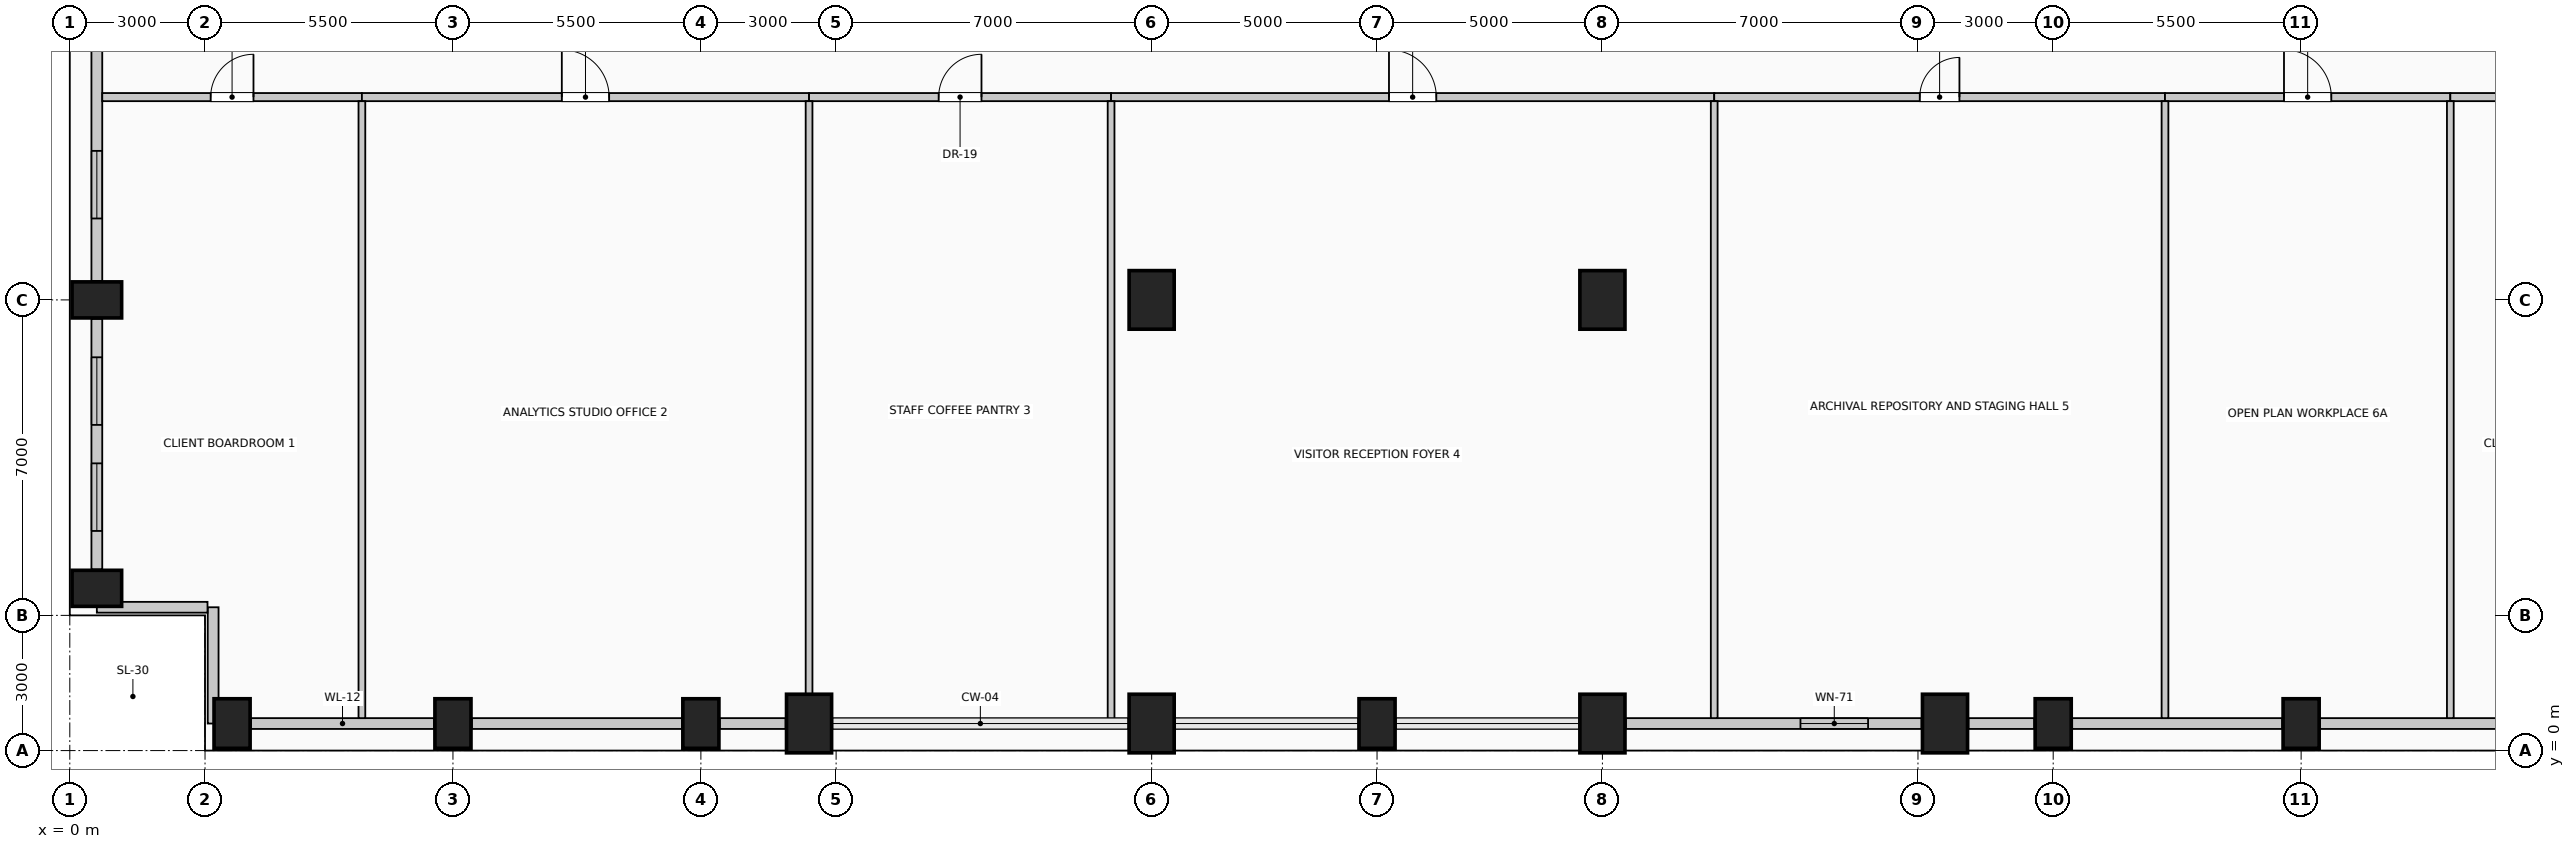
"""IFC4 building model, lengths in metres.
Left out: names, types, materials, properties, quantities, classifications, styles, units other than length and angle.
Written with IfcOpenShell. Run it as: python <this file> out.ifc"""

import sys

from ifc_helpers import new_model, si_unit, direction, frame, frame_2d, origin, origin_2d, place, context, subcontext, project, spatial, rectangle, extrude, element, fill, save


model = new_model("IFC4")
c1 = context("Model", 3, precision=1e-05, world=origin(), true_north=direction((0.0, 1.0)))
c2 = subcontext(c1, "Body", "Model", "MODEL_VIEW")
j1 = project(units=[si_unit("LENGTHUNIT", "METRE"), si_unit("PLANEANGLEUNIT", "RADIAN")], contexts=[c1])
p1 = place(None, origin())
s1 = spatial("IfcSite", under=j1, at=p1, CompositionType="ELEMENT")
p2 = place(p1, origin())
s2 = spatial("IfcBuilding", under=s1, at=p2, CompositionType="ELEMENT")
p3 = place(p2, frame((0.0, 0.0, 202.6)))
s3 = spatial("IfcBuildingStorey", under=s2, at=p3, CompositionType="ELEMENT", Elevation=202.6)
for number, where, z_axis, x_axis in (
    (1, (3.6, 0.6, 0.0), (0.0, 0.0, 1.0), (1.0, 0.0, 0.0)),
    (2, (8.5, 0.6, 0.0), (0.0, 0.0, 1.0), (1.0, 0.0, 0.0)),
    (3, (14.0, 0.6, 0.0), (0.0, 0.0, 1.0), (1.0, 0.0, 0.0)),
):
    element("IfcColumn", number, at=place(p3, frame(where, z_axis=z_axis, x_axis=x_axis)), inside=s3, PredefinedType="COLUMN", context=c2, shape_type="SweptSolid", body=[
        extrude(rectangle(XDim=0.8, YDim=1.1, at=origin_2d()), origin(), (0.0, 0.0, 1.0), 4.0),
    ])
for number, where, z_axis, x_axis in (
    (4, (16.4, 0.6, 0.0), (0.0, 0.0, 1.0), (1.0, 0.0, 0.0)),
    (5, (24.0, 0.6, 0.0), (0.0, 0.0, 1.0), (1.0, 0.0, 0.0)),
):
    element("IfcColumn", number, at=place(p3, frame(where, z_axis=z_axis, x_axis=x_axis)), inside=s3, PredefinedType="COLUMN", context=c2, shape_type="SweptSolid", body=[
        extrude(rectangle(XDim=1.0, YDim=1.3, at=origin_2d()), origin(), (0.0, 0.0, 1.0), 4.0),
    ])
p4 = place(p3, frame((29.0, 0.6, 0.0), z_axis=(0.0, 0.0, 1.0), x_axis=(1.0, 0.0, 0.0)))
e6 = element("IfcColumn", 6, at=p4, inside=s3, PredefinedType="COLUMN", context=c2, shape_type="SweptSolid", body=[
    extrude(rectangle(XDim=0.8, YDim=1.1, at=origin_2d()), origin(), (0.0, 0.0, 1.0), 4.0),
])
for number, where, z_axis, x_axis in (
    (7, (34.0, 0.6, 0.0), (0.0, 0.0, 1.0), (1.0, 0.0, 0.0)),
    (8, (41.6, 0.6, 0.0), (0.0, 0.0, 1.0), (1.0, 0.0, 0.0)),
):
    element("IfcColumn", number, at=place(p3, frame(where, z_axis=z_axis, x_axis=x_axis)), inside=s3, PredefinedType="COLUMN", context=c2, shape_type="SweptSolid", body=[
        extrude(rectangle(XDim=1.0, YDim=1.3, at=origin_2d()), origin(), (0.0, 0.0, 1.0), 4.0),
    ])
for number, where, z_axis, x_axis in (
    (9, (44.0, 0.6, 0.0), (0.0, 0.0, 1.0), (1.0, 0.0, 0.0)),
    (10, (49.5, 0.6, 0.0), (0.0, 0.0, 1.0), (1.0, 0.0, 0.0)),
    (11, (0.6, 3.6, 0.0), (0.0, 0.0, 1.0), (0.0, 1.0, 0.0)),
    (12, (0.6, 10.0, 0.0), (0.0, 0.0, 1.0), (0.0, 1.0, 0.0)),
):
    element("IfcColumn", number, at=place(p3, frame(where, z_axis=z_axis, x_axis=x_axis)), inside=s3, PredefinedType="COLUMN", context=c2, shape_type="SweptSolid", body=[
        extrude(rectangle(XDim=0.8, YDim=1.1, at=origin_2d()), origin(), (0.0, 0.0, 1.0), 4.0),
    ])
for number, where, z_axis, x_axis in (
    (13, (24.0, 10.0, 0.0), (0.0, 0.0, 1.0), (1.0, 0.0, 0.0)),
    (14, (34.0, 10.0, 0.0), (0.0, 0.0, 1.0), (1.0, 0.0, 0.0)),
):
    element("IfcColumn", number, at=place(p3, frame(where, z_axis=z_axis, x_axis=x_axis)), inside=s3, PredefinedType="COLUMN", context=c2, shape_type="SweptSolid", body=[
        extrude(rectangle(XDim=1.0, YDim=1.3, at=origin_2d()), origin(), (0.0, 0.0, 1.0), 4.0),
    ])
p5 = place(p3, frame((8.08, 0.6, 0.0), z_axis=(0.0, 0.0, 1.0), x_axis=(-1.0, 0.0, 0.0)))
e15 = element("IfcWall", 15, at=p5, inside=s3, PredefinedType="SOLIDWALL", context=c2, shape_type="SweptSolid", body=[
    extrude(rectangle(XDim=4.06, YDim=0.24, at=frame_2d((2.03, 0.0))), origin(), (0.0, 0.0, 1.0), 3.0),
])
p6 = place(p3, frame((13.58, 0.6, 0.0), z_axis=(0.0, 0.0, 1.0), x_axis=(-1.0, 0.0, 0.0)))
e16 = element("IfcWall", 16, at=p6, inside=s3, PredefinedType="SOLIDWALL", context=c2, shape_type="SweptSolid", body=[
    extrude(rectangle(XDim=4.66, YDim=0.24, at=frame_2d((2.33, 0.0))), origin(), (0.0, 0.0, 1.0), 3.0),
])
p7 = place(p3, frame((15.88, 0.6, 0.0), z_axis=(0.0, 0.0, 1.0), x_axis=(-1.0, 0.0, 0.0)))
e17 = element("IfcWall", 17, at=p7, inside=s3, PredefinedType="SOLIDWALL", context=c2, shape_type="SweptSolid", body=[
    extrude(rectangle(XDim=1.46, YDim=0.24, at=frame_2d((0.73, 0.0))), origin(), (0.0, 0.0, 1.0), 3.0),
])
p8 = place(p3, frame((41.08, 0.6, 0.0), z_axis=(0.0, 0.0, 1.0), x_axis=(-1.0, 0.0, 0.0)))
e18 = element("IfcWall", 18, at=p8, inside=s3, PredefinedType="SOLIDWALL", context=c2, shape_type="SweptSolid", body=[
    extrude(rectangle(XDim=6.56, YDim=0.24, at=frame_2d((3.28, 0.0))), origin(), (0.0, 0.0, 1.0), 3.0),
])
p9 = place(p8, frame((1.187, 0.0, 0.42)))
e19 = element("IfcOpeningElement", 19, at=p9, cuts=e18, PredefinedType="OPENING", context=c2, shape_type="SweptSolid", body=[
    extrude(rectangle(XDim=1.5, YDim=2.2, at=frame_2d((0.75, 1.1))), frame((0.0, 0.13, 0.0), z_axis=(0.0, -1.0, 0.0), x_axis=(1.0, 0.0, 0.0)), (0.0, 0.0, 1.0), 0.26),
])
p10 = place(p3, frame((43.58, 0.6, 0.0), z_axis=(0.0, 0.0, 1.0), x_axis=(-1.0, 0.0, 0.0)))
e20 = element("IfcWall", 20, at=p10, inside=s3, PredefinedType="SOLIDWALL", context=c2, shape_type="SweptSolid", body=[
    extrude(rectangle(XDim=1.46, YDim=0.24, at=frame_2d((0.73, 0.0))), origin(), (0.0, 0.0, 1.0), 3.0),
])
p11 = place(p3, frame((49.08, 0.6, 0.0), z_axis=(0.0, 0.0, 1.0), x_axis=(-1.0, 0.0, 0.0)))
e21 = element("IfcWall", 21, at=p11, inside=s3, PredefinedType="SOLIDWALL", context=c2, shape_type="SweptSolid", body=[
    extrude(rectangle(XDim=4.66, YDim=0.24, at=frame_2d((2.33, 0.0))), origin(), (0.0, 0.0, 1.0), 3.0),
])
p12 = place(p3, frame((53.98, 0.6, 0.0), z_axis=(0.0, 0.0, 1.0), x_axis=(-1.0, 0.0, 0.0)))
e22 = element("IfcWall", 22, at=p12, inside=s3, PredefinedType="SOLIDWALL", context=c2, shape_type="SweptSolid", body=[
    extrude(rectangle(XDim=4.06, YDim=0.24, at=frame_2d((2.03, 0.0))), origin(), (0.0, 0.0, 1.0), 3.0),
])
p13 = place(p3, frame((0.6, 4.02, 0.0), z_axis=(0.0, 0.0, 1.0), x_axis=(0.0, 1.0, 0.0)))
e23 = element("IfcWall", 23, at=p13, inside=s3, PredefinedType="SOLIDWALL", context=c2, shape_type="SweptSolid", body=[
    extrude(rectangle(XDim=5.56, YDim=0.24, at=frame_2d((2.78, 0.0))), origin(), (0.0, 0.0, 1.0), 3.0),
])
p14 = place(p13, frame((0.853, 0.0, 0.42)))
e24 = element("IfcOpeningElement", 24, at=p14, cuts=e23, PredefinedType="OPENING", context=c2, shape_type="SweptSolid", body=[
    extrude(rectangle(XDim=1.5, YDim=2.2, at=frame_2d((0.75, 1.1))), frame((0.0, 0.13, 0.0), z_axis=(0.0, -1.0, 0.0), x_axis=(1.0, 0.0, 0.0)), (0.0, 0.0, 1.0), 0.26),
])
p15 = place(p13, frame((3.207, 0.0, 0.42)))
e25 = element("IfcOpeningElement", 25, at=p15, cuts=e23, PredefinedType="OPENING", context=c2, shape_type="SweptSolid", body=[
    extrude(rectangle(XDim=1.5, YDim=2.2, at=frame_2d((0.75, 1.1))), frame((0.0, 0.13, 0.0), z_axis=(0.0, -1.0, 0.0), x_axis=(1.0, 0.0, 0.0)), (0.0, 0.0, 1.0), 0.26),
])
p16 = place(p3, frame((0.6, 10.42, 0.0), z_axis=(0.0, 0.0, 1.0), x_axis=(0.0, 1.0, 0.0)))
e26 = element("IfcWall", 26, at=p16, inside=s3, PredefinedType="SOLIDWALL", context=c2, shape_type="SweptSolid", body=[
    extrude(rectangle(XDim=7.16, YDim=0.24, at=frame_2d((3.58, 0.0))), origin(), (0.0, 0.0, 1.0), 3.0),
])
p17 = place(p16, frame((1.387, 0.0, 0.42)))
e27 = element("IfcOpeningElement", 27, at=p17, cuts=e26, PredefinedType="OPENING", context=c2, shape_type="SweptSolid", body=[
    extrude(rectangle(XDim=1.5, YDim=2.2, at=frame_2d((0.75, 1.1))), frame((0.0, 0.13, 0.0), z_axis=(0.0, -1.0, 0.0), x_axis=(1.0, 0.0, 0.0)), (0.0, 0.0, 1.0), 0.26),
])
p18 = place(p3, frame((3.18, 0.6, 0.0), z_axis=(0.0, 0.0, 1.0), x_axis=(0.0, 1.0, 0.0)))
e28 = element("IfcWall", 28, at=p18, inside=s3, PredefinedType="SOLIDWALL", context=c2, shape_type="SweptSolid", body=[
    extrude(rectangle(XDim=2.58, YDim=0.24, at=frame_2d((1.29, 0.0))), origin(), (0.0, 0.0, 1.0), 3.75),
])
p19 = place(p3, frame((3.055, 3.18, 0.0), z_axis=(0.0, 0.0, 1.0), x_axis=(-1.0, 0.0, 0.0)))
e29 = element("IfcWall", 29, at=p19, inside=s3, PredefinedType="SOLIDWALL", context=c2, shape_type="SweptSolid", body=[
    extrude(rectangle(XDim=2.455, YDim=0.24, at=frame_2d((1.228, 0.0))), origin(), (0.0, 0.0, 1.0), 3.75),
])
p20 = place(p3, frame((0.72, 14.5, 0.0), z_axis=(0.0, 0.0, 1.0), x_axis=(1.0, 0.0, 0.0)))
e30 = element("IfcWall", 30, at=p20, inside=s3, PredefinedType="PARTITIONING", context=c2, shape_type="SweptSolid", body=[
    extrude(rectangle(XDim=5.76, YDim=0.18, at=frame_2d((2.88, 0.0))), origin(), (0.0, 0.0, 1.0), 3.75),
])
p21 = place(p20, frame((2.405, 0.0, 0.0)))
e31 = element("IfcOpeningElement", 31, at=p21, cuts=e30, PredefinedType="OPENING", context=c2, shape_type="SweptSolid", body=[
    extrude(rectangle(XDim=0.95, YDim=2.15, at=frame_2d((0.475, 1.075))), frame((0.0, 0.1, 0.0), z_axis=(0.0, -1.0, 0.0), x_axis=(1.0, 0.0, 0.0)), (0.0, 0.0, 1.0), 0.2),
])
p22 = place(p3, frame((6.48, 14.5, 0.0), z_axis=(0.0, 0.0, 1.0), x_axis=(1.0, 0.0, 0.0)))
e32 = element("IfcWall", 32, at=p22, inside=s3, PredefinedType="PARTITIONING", context=c2, shape_type="SweptSolid", body=[
    extrude(rectangle(XDim=9.92, YDim=0.18, at=frame_2d((4.96, 0.0))), origin(), (0.0, 0.0, 1.0), 3.75),
])
p23 = place(p22, frame((4.435, 0.0, 0.0)))
e33 = element("IfcOpeningElement", 33, at=p23, cuts=e32, PredefinedType="OPENING", context=c2, shape_type="SweptSolid", body=[
    extrude(rectangle(XDim=1.05, YDim=2.15, at=frame_2d((0.525, 1.075))), frame((0.0, 0.1, 0.0), z_axis=(0.0, -1.0, 0.0), x_axis=(1.0, 0.0, 0.0)), (0.0, 0.0, 1.0), 0.2),
])
p24 = place(p3, frame((16.4, 14.5, 0.0), z_axis=(0.0, 0.0, 1.0), x_axis=(1.0, 0.0, 0.0)))
e34 = element("IfcWall", 34, at=p24, inside=s3, PredefinedType="PARTITIONING", context=c2, shape_type="SweptSolid", body=[
    extrude(rectangle(XDim=6.7, YDim=0.18, at=frame_2d((3.35, 0.0))), origin(), (0.0, 0.0, 1.0), 3.75),
])
p25 = place(p24, frame((2.875, 0.0, 0.0)))
e35 = element("IfcOpeningElement", 35, at=p25, cuts=e34, PredefinedType="OPENING", context=c2, shape_type="SweptSolid", body=[
    extrude(rectangle(XDim=0.95, YDim=2.15, at=frame_2d((0.475, 1.075))), frame((0.0, 0.1, 0.0), z_axis=(0.0, -1.0, 0.0), x_axis=(1.0, 0.0, 0.0)), (0.0, 0.0, 1.0), 0.2),
])
p26 = place(p3, frame((23.1, 14.5, 0.0), z_axis=(0.0, 0.0, 1.0), x_axis=(1.0, 0.0, 0.0)))
e36 = element("IfcWall", 36, at=p26, inside=s3, PredefinedType="PARTITIONING", context=c2, shape_type="SweptSolid", body=[
    extrude(rectangle(XDim=13.38, YDim=0.18, at=frame_2d((6.69, 0.0))), origin(), (0.0, 0.0, 1.0), 3.75),
])
p27 = place(p26, frame((6.165, 0.0, 0.0)))
e37 = element("IfcOpeningElement", 37, at=p27, cuts=e36, PredefinedType="OPENING", context=c2, shape_type="SweptSolid", body=[
    extrude(rectangle(XDim=1.05, YDim=2.15, at=frame_2d((0.525, 1.075))), frame((0.0, 0.1, 0.0), z_axis=(0.0, -1.0, 0.0), x_axis=(1.0, 0.0, 0.0)), (0.0, 0.0, 1.0), 0.2),
])
p28 = place(p3, frame((36.48, 14.5, 0.0), z_axis=(0.0, 0.0, 1.0), x_axis=(1.0, 0.0, 0.0)))
e38 = element("IfcWall", 38, at=p28, inside=s3, PredefinedType="PARTITIONING", context=c2, shape_type="SweptSolid", body=[
    extrude(rectangle(XDim=10.0, YDim=0.18, at=frame_2d((5.0, 0.0))), origin(), (0.0, 0.0, 1.0), 3.75),
])
p29 = place(p28, frame((4.56, 0.0, 0.0)))
e39 = element("IfcOpeningElement", 39, at=p29, cuts=e38, PredefinedType="OPENING", context=c2, shape_type="SweptSolid", body=[
    extrude(rectangle(XDim=0.88, YDim=2.1, at=frame_2d((0.44, 1.05))), frame((0.0, 0.1, 0.0), z_axis=(0.0, -1.0, 0.0), x_axis=(1.0, 0.0, 0.0)), (0.0, 0.0, 1.0), 0.2),
])
p30 = place(p3, frame((46.48, 14.5, 0.0), z_axis=(0.0, 0.0, 1.0), x_axis=(1.0, 0.0, 0.0)))
e40 = element("IfcWall", 40, at=p30, inside=s3, PredefinedType="PARTITIONING", context=c2, shape_type="SweptSolid", body=[
    extrude(rectangle(XDim=6.33, YDim=0.18, at=frame_2d((3.165, 0.0))), origin(), (0.0, 0.0, 1.0), 3.75),
])
p31 = place(p30, frame((2.64, 0.0, 0.0)))
e41 = element("IfcOpeningElement", 41, at=p31, cuts=e40, PredefinedType="OPENING", context=c2, shape_type="SweptSolid", body=[
    extrude(rectangle(XDim=1.05, YDim=2.15, at=frame_2d((0.525, 1.075))), frame((0.0, 0.1, 0.0), z_axis=(0.0, -1.0, 0.0), x_axis=(1.0, 0.0, 0.0)), (0.0, 0.0, 1.0), 0.2),
])
p32 = place(p3, frame((52.81, 14.5, 0.0), z_axis=(0.0, 0.0, 1.0), x_axis=(1.0, 0.0, 0.0)))
e42 = element("IfcWall", 42, at=p32, inside=s3, PredefinedType="PARTITIONING", context=c2, shape_type="SweptSolid", body=[
    extrude(rectangle(XDim=4.47, YDim=0.18, at=frame_2d((2.235, 0.0))), origin(), (0.0, 0.0, 1.0), 3.75),
])
p33 = place(p32, frame((1.76, 0.0, 0.0)))
e43 = element("IfcOpeningElement", 43, at=p33, cuts=e42, PredefinedType="OPENING", context=c2, shape_type="SweptSolid", body=[
    extrude(rectangle(XDim=0.95, YDim=2.15, at=frame_2d((0.475, 1.075))), frame((0.0, 0.1, 0.0), z_axis=(0.0, -1.0, 0.0), x_axis=(1.0, 0.0, 0.0)), (0.0, 0.0, 1.0), 0.2),
])
p34 = place(p3, frame((6.48, 0.72, 0.0), z_axis=(0.0, 0.0, 1.0), x_axis=(0.0, 1.0, 0.0)))
e44 = element("IfcWall", 44, at=p34, inside=s3, PredefinedType="PARTITIONING", context=c2, shape_type="SweptSolid", body=[
    extrude(rectangle(XDim=13.69, YDim=0.15, at=frame_2d((6.845, 0.0))), origin(), (0.0, 0.0, 1.0), 3.75),
])
p35 = place(p3, frame((16.4, 1.25, 0.0), z_axis=(0.0, 0.0, 1.0), x_axis=(0.0, 1.0, 0.0)))
e45 = element("IfcWall", 45, at=p35, inside=s3, PredefinedType="PARTITIONING", context=c2, shape_type="SweptSolid", body=[
    extrude(rectangle(XDim=13.16, YDim=0.15, at=frame_2d((6.58, 0.0))), origin(), (0.0, 0.0, 1.0), 3.145),
])
p36 = place(p3, frame((23.1, 0.6, 0.0), z_axis=(0.0, 0.0, 1.0), x_axis=(0.0, 1.0, 0.0)))
e46 = element("IfcWall", 46, at=p36, inside=s3, PredefinedType="PARTITIONING", context=c2, shape_type="SweptSolid", body=[
    extrude(rectangle(XDim=13.81, YDim=0.15, at=frame_2d((6.905, 0.0))), origin(), (0.0, 0.0, 1.0), 3.75),
])
for number, where, z_axis, x_axis in (
    (47, (36.48, 0.72, 0.0), (0.0, 0.0, 1.0), (0.0, 1.0, 0.0)),
    (48, (46.48, 0.72, 0.0), (0.0, 0.0, 1.0), (0.0, 1.0, 0.0)),
    (49, (52.81, 0.72, 0.0), (0.0, 0.0, 1.0), (0.0, 1.0, 0.0)),
):
    element("IfcWall", number, at=place(p3, frame(where, z_axis=z_axis, x_axis=x_axis)), inside=s3, PredefinedType="PARTITIONING", context=c2, shape_type="SweptSolid", body=[
        extrude(rectangle(XDim=13.69, YDim=0.15, at=frame_2d((6.845, 0.0))), origin(), (0.0, 0.0, 1.0), 3.75),
    ])
p37 = place(p9, origin())
e50 = element("IfcWindow", 50, at=p37, inside=s3, PartitioningType="SINGLE_PANEL", PredefinedType="WINDOW", context=c2, shape_type="SweptSolid", body=[
    extrude(rectangle(XDim=1.5, YDim=2.2, at=frame_2d((0.75, 1.1))), frame((0.0, 0.03, 0.0), z_axis=(0.0, -1.0, 0.0), x_axis=(1.0, 0.0, 0.0)), (0.0, 0.0, 1.0), 0.06),
])
fill(e19, e50)
p38 = place(p14, origin())
e51 = element("IfcWindow", 51, at=p38, inside=s3, PartitioningType="SINGLE_PANEL", PredefinedType="WINDOW", context=c2, shape_type="SweptSolid", body=[
    extrude(rectangle(XDim=1.5, YDim=2.2, at=frame_2d((0.75, 1.1))), frame((0.0, 0.03, 0.0), z_axis=(0.0, -1.0, 0.0), x_axis=(1.0, 0.0, 0.0)), (0.0, 0.0, 1.0), 0.06),
])
fill(e24, e51)
p39 = place(p15, origin())
e52 = element("IfcWindow", 52, at=p39, inside=s3, PartitioningType="SINGLE_PANEL", PredefinedType="WINDOW", context=c2, shape_type="SweptSolid", body=[
    extrude(rectangle(XDim=1.5, YDim=2.2, at=frame_2d((0.75, 1.1))), frame((0.0, 0.03, 0.0), z_axis=(0.0, -1.0, 0.0), x_axis=(1.0, 0.0, 0.0)), (0.0, 0.0, 1.0), 0.06),
])
fill(e25, e52)
p40 = place(p17, origin())
e53 = element("IfcWindow", 53, at=p40, inside=s3, PartitioningType="SINGLE_PANEL", PredefinedType="WINDOW", context=c2, shape_type="SweptSolid", body=[
    extrude(rectangle(XDim=1.5, YDim=2.2, at=frame_2d((0.75, 1.1))), frame((0.0, 0.03, 0.0), z_axis=(0.0, -1.0, 0.0), x_axis=(1.0, 0.0, 0.0)), (0.0, 0.0, 1.0), 0.06),
])
fill(e27, e53)
p41 = place(p21, origin())
e54 = element("IfcDoor", 54, at=p41, inside=s3, OperationType="SINGLE_SWING_RIGHT", PredefinedType="DOOR", context=c2, shape_type="SweptSolid", body=[
    extrude(rectangle(XDim=0.95, YDim=2.15, at=frame_2d((0.475, 1.075))), frame((0.0, 0.025, 0.0), z_axis=(0.0, -1.0, 0.0), x_axis=(1.0, 0.0, 0.0)), (0.0, 0.0, 1.0), 0.05),
])
fill(e31, e54)
p42 = place(p23, origin())
e55 = element("IfcDoor", 55, at=p42, inside=s3, OperationType="SINGLE_SWING_LEFT", PredefinedType="DOOR", context=c2, shape_type="SweptSolid", body=[
    extrude(rectangle(XDim=1.05, YDim=2.15, at=frame_2d((0.525, 1.075))), frame((0.0, 0.025, 0.0), z_axis=(0.0, -1.0, 0.0), x_axis=(1.0, 0.0, 0.0)), (0.0, 0.0, 1.0), 0.05),
])
fill(e33, e55)
p43 = place(p25, origin())
e56 = element("IfcDoor", 56, at=p43, inside=s3, OperationType="SINGLE_SWING_RIGHT", PredefinedType="DOOR", context=c2, shape_type="SweptSolid", body=[
    extrude(rectangle(XDim=0.95, YDim=2.15, at=frame_2d((0.475, 1.075))), frame((0.0, 0.025, 0.0), z_axis=(0.0, -1.0, 0.0), x_axis=(1.0, 0.0, 0.0)), (0.0, 0.0, 1.0), 0.05),
])
fill(e35, e56)
p44 = place(p27, origin())
e57 = element("IfcDoor", 57, at=p44, inside=s3, OperationType="SINGLE_SWING_LEFT", PredefinedType="DOOR", context=c2, shape_type="SweptSolid", body=[
    extrude(rectangle(XDim=1.05, YDim=2.15, at=frame_2d((0.525, 1.075))), frame((0.0, 0.025, 0.0), z_axis=(0.0, -1.0, 0.0), x_axis=(1.0, 0.0, 0.0)), (0.0, 0.0, 1.0), 0.05),
])
fill(e37, e57)
p45 = place(p29, origin())
e58 = element("IfcDoor", 58, at=p45, inside=s3, OperationType="SINGLE_SWING_RIGHT", PredefinedType="DOOR", context=c2, shape_type="SweptSolid", body=[
    extrude(rectangle(XDim=0.88, YDim=2.1, at=frame_2d((0.44, 1.05))), frame((0.0, 0.025, 0.0), z_axis=(0.0, -1.0, 0.0), x_axis=(1.0, 0.0, 0.0)), (0.0, 0.0, 1.0), 0.05),
])
fill(e39, e58)
p46 = place(p31, origin())
e59 = element("IfcDoor", 59, at=p46, inside=s3, OperationType="SINGLE_SWING_LEFT", PredefinedType="DOOR", context=c2, shape_type="SweptSolid", body=[
    extrude(rectangle(XDim=1.05, YDim=2.15, at=frame_2d((0.525, 1.075))), frame((0.0, 0.025, 0.0), z_axis=(0.0, -1.0, 0.0), x_axis=(1.0, 0.0, 0.0)), (0.0, 0.0, 1.0), 0.05),
])
fill(e41, e59)
save(model, sys.argv[1])
